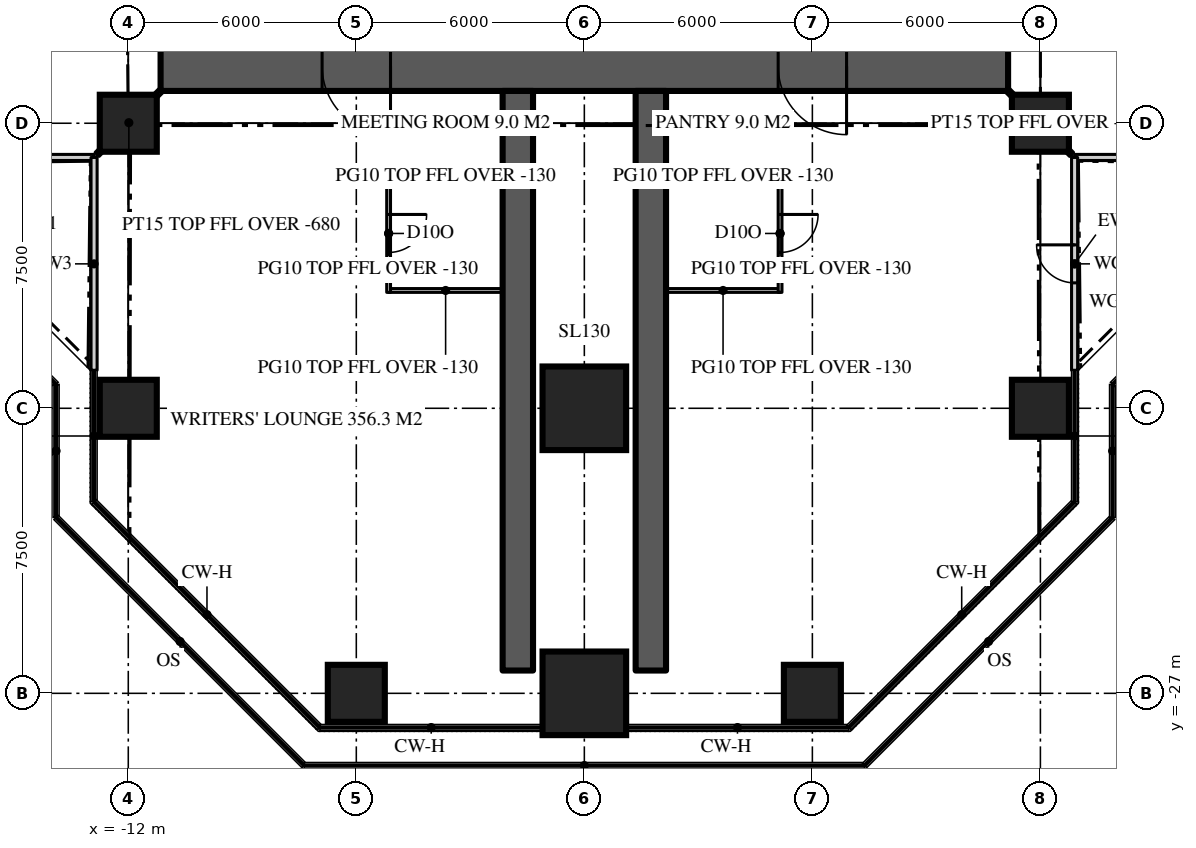
"""IFC4 building model, lengths in metres.
Left out: names, types, materials, properties, quantities, classifications, styles, units other than length and angle.
Written with IfcOpenShell. Run it as: python <this file> out.ifc"""

import sys

from ifc_helpers import new_model, si_unit, direction, frame, frame_2d, origin, origin_2d, place, context, subcontext, project, spatial, rectangle, extrude, element, fill, save


model = new_model("IFC4")
c1 = context("Model", 3, precision=1e-05, world=origin(), true_north=direction((0.0, 1.0)))
c2 = subcontext(c1, "Body", "Model", "MODEL_VIEW")
j1 = project(units=[si_unit("LENGTHUNIT", "METRE"), si_unit("PLANEANGLEUNIT", "RADIAN")], contexts=[c1])
p1 = place(None, origin())
s1 = spatial("IfcSite", under=j1, at=p1, CompositionType="ELEMENT")
p2 = place(p1, origin())
s2 = spatial("IfcBuilding", under=s1, at=p2, CompositionType="ELEMENT")
p3 = place(p2, frame((0.0, 0.0, 251.7)))
s3 = spatial("IfcBuildingStorey", under=s2, at=p3, CompositionType="ELEMENT", Elevation=251.7)
p4 = place(p3, frame((11.15, -10.5, 0.0), z_axis=(0.0, 0.0, 1.0), x_axis=(-1.0, 0.0, 0.0)))
e1 = element("IfcWall", 1, at=p4, inside=s3, PredefinedType="SHEAR", context=c2, shape_type="SweptSolid", body=[
    extrude(rectangle(XDim=22.3, YDim=1.3, at=frame_2d((11.15, 0.0))), origin(), (0.0, 0.0, 1.0), 3.9),
])
p5 = place(p4, frame((16.25, 0.0, 0.0)))
e2 = element("IfcOpeningElement", 2, at=p5, cuts=e1, PredefinedType="OPENING", context=c2, shape_type="SweptSolid", body=[
    extrude(rectangle(XDim=1.8, YDim=2.2, at=frame_2d((0.9, 1.1))), frame((0.0, 0.66, 0.0), z_axis=(0.0, -1.0, 0.0), x_axis=(1.0, 0.0, 0.0)), (0.0, 0.0, 1.0), 1.32),
])
p6 = place(p4, frame((4.25, 0.0, 0.0)))
e3 = element("IfcOpeningElement", 3, at=p6, cuts=e1, PredefinedType="OPENING", context=c2, shape_type="SweptSolid", body=[
    extrude(rectangle(XDim=1.8, YDim=2.2, at=frame_2d((0.9, 1.1))), frame((0.0, 0.66, 0.0), z_axis=(0.0, -1.0, 0.0), x_axis=(1.0, 0.0, 0.0)), (0.0, 0.0, 1.0), 1.32),
])
for number, where, z_axis, x_axis in (
    (4, (-1.75, -11.15, 0.0), (0.0, 0.0, 1.0), (0.0, -1.0, 0.0)),
    (5, (1.75, -11.15, 0.0), (0.0, 0.0, 1.0), (0.0, -1.0, 0.0)),
):
    element("IfcWall", number, at=place(p3, frame(where, z_axis=z_axis, x_axis=x_axis)), inside=s3, PredefinedType="SHEAR", context=c2, shape_type="SweptSolid", body=[
        extrude(rectangle(XDim=15.25, YDim=0.8, at=frame_2d((7.625, 0.0))), origin(), (0.0, 0.0, 1.0), 3.9),
    ])
p7 = place(p3, frame((-6.0, -27.0, 0.0), z_axis=(0.0, 0.0, 1.0), x_axis=(1.0, 0.0, 0.0)))
e6 = element("IfcColumn", 6, at=p7, inside=s3, PredefinedType="COLUMN", context=c2, shape_type="SweptSolid", body=[
    extrude(rectangle(XDim=1.5, YDim=1.5, at=origin_2d()), origin(), (0.0, 0.0, 1.0), 3.9),
])
p8 = place(p3, frame((0.0, -27.0, 0.0), z_axis=(0.0, 0.0, 1.0), x_axis=(1.0, 0.0, 0.0)))
e7 = element("IfcColumn", 7, at=p8, inside=s3, PredefinedType="COLUMN", context=c2, shape_type="SweptSolid", body=[
    extrude(rectangle(XDim=2.2, YDim=2.2, at=origin_2d()), origin(), (0.0, 0.0, 1.0), 3.9),
])
for number, where, z_axis, x_axis in (
    (8, (6.0, -27.0, 0.0), (0.0, 0.0, 1.0), (1.0, 0.0, 0.0)),
    (9, (-12.0, -19.5, 0.0), (0.0, 0.0, 1.0), (1.0, 0.0, 0.0)),
):
    element("IfcColumn", number, at=place(p3, frame(where, z_axis=z_axis, x_axis=x_axis)), inside=s3, PredefinedType="COLUMN", context=c2, shape_type="SweptSolid", body=[
        extrude(rectangle(XDim=1.5, YDim=1.5, at=origin_2d()), origin(), (0.0, 0.0, 1.0), 3.9),
    ])
p9 = place(p3, frame((0.0, -19.5, 0.0), z_axis=(0.0, 0.0, 1.0), x_axis=(1.0, 0.0, 0.0)))
e10 = element("IfcColumn", 10, at=p9, inside=s3, PredefinedType="COLUMN", context=c2, shape_type="SweptSolid", body=[
    extrude(rectangle(XDim=2.2, YDim=2.2, at=origin_2d()), origin(), (0.0, 0.0, 1.0), 3.9),
])
for number, where, z_axis, x_axis in (
    (11, (12.0, -19.5, 0.0), (0.0, 0.0, 1.0), (1.0, 0.0, 0.0)),
    (12, (-12.0, -12.0, 0.0), (0.0, 0.0, 1.0), (1.0, 0.0, 0.0)),
    (13, (12.0, -12.0, 0.0), (0.0, 0.0, 1.0), (1.0, 0.0, 0.0)),
):
    element("IfcColumn", number, at=place(p3, frame(where, z_axis=z_axis, x_axis=x_axis)), inside=s3, PredefinedType="COLUMN", context=c2, shape_type="SweptSolid", body=[
        extrude(rectangle(XDim=1.5, YDim=1.5, at=origin_2d()), origin(), (0.0, 0.0, 1.0), 3.9),
    ])
p10 = place(p3, frame((12.9, -12.9, 0.0), z_axis=(0.0, 0.0, 1.0), x_axis=(1.0, 0.0, 0.0)))
e14 = element("IfcWall", 14, at=p10, inside=s3, PredefinedType="SOLIDWALL", context=c2, shape_type="SweptSolid", body=[
    extrude(rectangle(XDim=5.6, YDim=0.16, at=frame_2d((2.8, 0.0))), origin(), (0.0, 0.0, 1.0), 3.77),
])
p11 = place(p3, frame((-18.5, -12.9, 0.0), z_axis=(0.0, 0.0, 1.0), x_axis=(1.0, 0.0, 0.0)))
e15 = element("IfcWall", 15, at=p11, inside=s3, PredefinedType="SOLIDWALL", context=c2, shape_type="SweptSolid", body=[
    extrude(rectangle(XDim=5.6, YDim=0.16, at=frame_2d((2.8, 0.0))), origin(), (0.0, 0.0, 1.0), 3.77),
])
p12 = place(p11, frame((2.3, 0.0, 0.0)))
e16 = element("IfcOpeningElement", 16, at=p12, cuts=e15, PredefinedType="OPENING", context=c2, shape_type="SweptSolid", body=[
    extrude(rectangle(XDim=1.0, YDim=2.2, at=frame_2d((0.5, 1.1))), frame((0.0, 0.09, 0.0), z_axis=(0.0, -1.0, 0.0), x_axis=(1.0, 0.0, 0.0)), (0.0, 0.0, 1.0), 0.18),
])
p13 = place(p3, frame((-12.9, -12.9, 0.0), z_axis=(0.0, 0.0, 1.0), x_axis=(0.0, -1.0, 0.0)))
e17 = element("IfcWall", 17, at=p13, inside=s3, PredefinedType="SOLIDWALL", context=c2, shape_type="SweptSolid", body=[
    extrude(rectangle(XDim=5.6, YDim=0.16, at=frame_2d((2.8, 0.0))), origin(), (0.0, 0.0, 1.0), 3.77),
])
p14 = place(p3, frame((12.9, -18.5, 0.0), z_axis=(0.0, 0.0, 1.0), x_axis=(0.0, 1.0, 0.0)))
e18 = element("IfcWall", 18, at=p14, inside=s3, PredefinedType="SOLIDWALL", context=c2, shape_type="SweptSolid", body=[
    extrude(rectangle(XDim=5.6, YDim=0.16, at=frame_2d((2.8, 0.0))), origin(), (0.0, 0.0, 1.0), 3.77),
])
p15 = place(p14, frame((2.3, 0.0, 0.0)))
e19 = element("IfcOpeningElement", 19, at=p15, cuts=e18, PredefinedType="OPENING", context=c2, shape_type="SweptSolid", body=[
    extrude(rectangle(XDim=1.0, YDim=2.2, at=frame_2d((0.5, 1.1))), frame((0.0, 0.09, 0.0), z_axis=(0.0, -1.0, 0.0), x_axis=(1.0, 0.0, 0.0)), (0.0, 0.0, 1.0), 0.18),
])
for number, where, z_axis, x_axis in (
    (20, (2.15, -13.4, 0.0), (0.0, 0.0, 1.0), (1.0, 0.0, 0.0)),
    (21, (2.15, -16.4, 0.0), (0.0, 0.0, 1.0), (1.0, 0.0, 0.0)),
):
    element("IfcWall", number, at=place(p3, frame(where, z_axis=z_axis, x_axis=x_axis)), inside=s3, PredefinedType="PARTITIONING", context=c2, shape_type="SweptSolid", body=[
        extrude(rectangle(XDim=3.0, YDim=0.1, at=frame_2d((1.5, 0.0))), origin(), (0.0, 0.0, 1.0), 3.77),
    ])
p16 = place(p3, frame((5.15, -13.35, 0.0), z_axis=(0.0, 0.0, 1.0), x_axis=(0.0, -1.0, 0.0)))
e22 = element("IfcWall", 22, at=p16, inside=s3, PredefinedType="PARTITIONING", context=c2, shape_type="SweptSolid", body=[
    extrude(rectangle(XDim=3.1, YDim=0.1, at=frame_2d((1.55, 0.0))), origin(), (0.0, 0.0, 1.0), 3.77),
])
p17 = place(p16, frame((1.05, 0.0, 0.0)))
e23 = element("IfcOpeningElement", 23, at=p17, cuts=e22, PredefinedType="OPENING", context=c2, shape_type="SweptSolid", body=[
    extrude(rectangle(XDim=1.0, YDim=2.2, at=frame_2d((0.5, 1.1))), frame((0.0, 0.06, 0.0), z_axis=(0.0, -1.0, 0.0), x_axis=(1.0, 0.0, 0.0)), (0.0, 0.0, 1.0), 0.12),
])
for number, where, z_axis, x_axis in (
    (24, (-2.15, -13.4, 0.0), (0.0, 0.0, 1.0), (-1.0, 0.0, 0.0)),
    (25, (-2.15, -16.4, 0.0), (0.0, 0.0, 1.0), (-1.0, 0.0, 0.0)),
):
    element("IfcWall", number, at=place(p3, frame(where, z_axis=z_axis, x_axis=x_axis)), inside=s3, PredefinedType="PARTITIONING", context=c2, shape_type="SweptSolid", body=[
        extrude(rectangle(XDim=3.0, YDim=0.1, at=frame_2d((1.5, 0.0))), origin(), (0.0, 0.0, 1.0), 3.77),
    ])
p18 = place(p3, frame((-5.15, -13.35, 0.0), z_axis=(0.0, 0.0, 1.0), x_axis=(0.0, -1.0, 0.0)))
e26 = element("IfcWall", 26, at=p18, inside=s3, PredefinedType="PARTITIONING", context=c2, shape_type="SweptSolid", body=[
    extrude(rectangle(XDim=3.1, YDim=0.1, at=frame_2d((1.55, 0.0))), origin(), (0.0, 0.0, 1.0), 3.77),
])
p19 = place(p18, frame((1.05, 0.0, 0.0)))
e27 = element("IfcOpeningElement", 27, at=p19, cuts=e26, PredefinedType="OPENING", context=c2, shape_type="SweptSolid", body=[
    extrude(rectangle(XDim=1.0, YDim=2.2, at=frame_2d((0.5, 1.1))), frame((0.0, 0.06, 0.0), z_axis=(0.0, -1.0, 0.0), x_axis=(1.0, 0.0, 0.0)), (0.0, 0.0, 1.0), 0.12),
])
for number, where, z_axis, x_axis in (
    (28, (-11.15, -11.15, 0.0), (0.0, 0.0, 1.0), (-0.707, -0.707, 0.0)),
    (29, (11.15, -11.15, 0.0), (0.0, 0.0, 1.0), (0.707, -0.707, 0.0)),
):
    element("IfcWall", number, at=place(p3, frame(where, z_axis=z_axis, x_axis=x_axis)), inside=s3, PredefinedType="PARTITIONING", context=c2, shape_type="SweptSolid", body=[
        extrude(rectangle(XDim=2.362, YDim=0.15, at=frame_2d((1.181, 0.0))), origin(), (0.0, 0.0, 1.0), 3.22),
    ])
p20 = place(p15, origin())
e30 = element("IfcDoor", 30, at=p20, inside=s3, OperationType="SINGLE_SWING_RIGHT", PredefinedType="DOOR", context=c2, shape_type="SweptSolid", body=[
    extrude(rectangle(XDim=1.0, YDim=2.2, at=frame_2d((0.5, 1.1))), frame((0.0, 0.025, 0.0), z_axis=(0.0, -1.0, 0.0), x_axis=(1.0, 0.0, 0.0)), (0.0, 0.0, 1.0), 0.05),
])
fill(e19, e30)
p21 = place(p5, origin())
e31 = element("IfcDoor", 31, at=p21, inside=s3, OperationType="DOUBLE_DOOR_DOUBLE_SWING", PredefinedType="DOOR", context=c2, shape_type="SweptSolid", body=[
    extrude(rectangle(XDim=1.8, YDim=2.2, at=frame_2d((0.9, 1.1))), frame((0.0, 0.025, 0.0), z_axis=(0.0, -1.0, 0.0), x_axis=(1.0, 0.0, 0.0)), (0.0, 0.0, 1.0), 0.05),
])
fill(e2, e31)
p22 = place(p6, origin())
e32 = element("IfcDoor", 32, at=p22, inside=s3, OperationType="DOUBLE_DOOR_DOUBLE_SWING", PredefinedType="DOOR", context=c2, shape_type="SweptSolid", body=[
    extrude(rectangle(XDim=1.8, YDim=2.2, at=frame_2d((0.9, 1.1))), frame((0.0, 0.025, 0.0), z_axis=(0.0, -1.0, 0.0), x_axis=(1.0, 0.0, 0.0)), (0.0, 0.0, 1.0), 0.05),
])
fill(e3, e32)
p23 = place(p17, origin())
e33 = element("IfcDoor", 33, at=p23, inside=s3, OperationType="SINGLE_SWING_LEFT", PredefinedType="DOOR", context=c2, shape_type="SweptSolid", body=[
    extrude(rectangle(XDim=1.0, YDim=2.2, at=frame_2d((0.5, 1.1))), frame((0.0, 0.025, 0.0), z_axis=(0.0, -1.0, 0.0), x_axis=(1.0, 0.0, 0.0)), (0.0, 0.0, 1.0), 0.05),
])
fill(e23, e33)
p24 = place(p19, origin())
e34 = element("IfcDoor", 34, at=p24, inside=s3, OperationType="SINGLE_SWING_LEFT", PredefinedType="DOOR", context=c2, shape_type="SweptSolid", body=[
    extrude(rectangle(XDim=1.0, YDim=2.2, at=frame_2d((0.5, 1.1))), frame((0.0, 0.025, 0.0), z_axis=(0.0, -1.0, 0.0), x_axis=(1.0, 0.0, 0.0)), (0.0, 0.0, 1.0), 0.05),
])
fill(e27, e34)
save(model, sys.argv[1])
